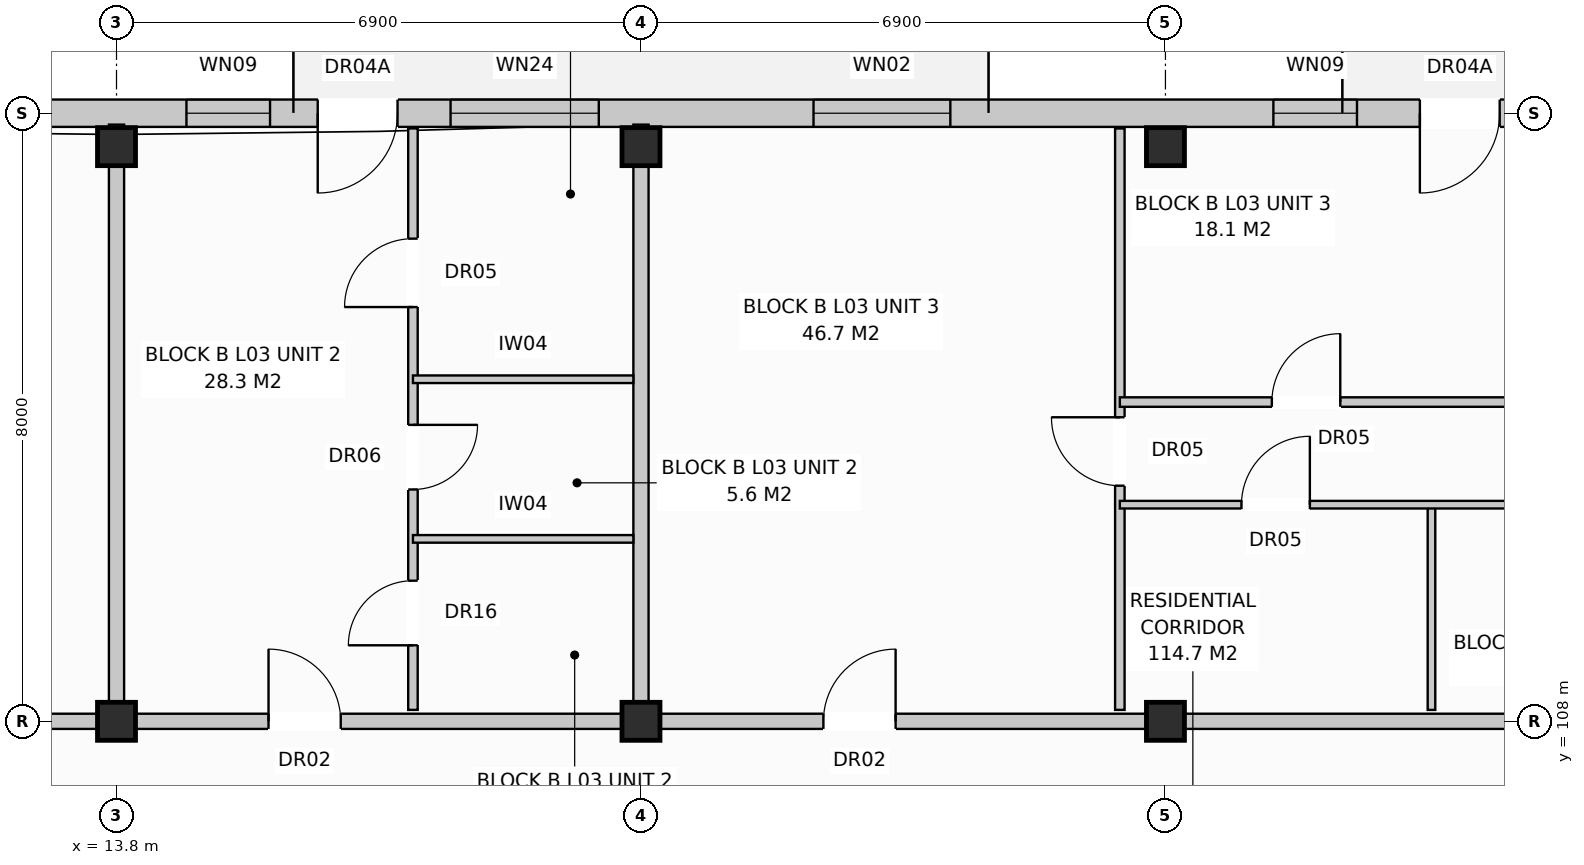
"""IFC4 building model, lengths in metres.
Left out: names, types, materials, properties, quantities, classifications, styles, units other than length and angle.
Written with IfcOpenShell. Run it as: python <this file> out.ifc"""

import sys

from ifc_helpers import new_model, si_unit, direction, frame, frame_2d, origin, origin_with_axes, origin_2d, place, context, subcontext, project, spatial, rectangle, extrude, element, fill, save


model = new_model("IFC4")
c1 = context("Model", 3, precision=1e-05, world=origin(), true_north=direction((0.0, 1.0)))
c2 = subcontext(c1, "Body", "Model", "MODEL_VIEW")
j1 = project(units=[si_unit("LENGTHUNIT", "METRE"), si_unit("PLANEANGLEUNIT", "RADIAN")], contexts=[c1])
p1 = place(None, origin())
s1 = spatial("IfcSite", under=j1, at=p1, CompositionType="ELEMENT")
p2 = place(p1, origin())
s2 = spatial("IfcBuilding", under=s1, at=p2, CompositionType="ELEMENT")
p3 = place(p2, frame((0.0, 0.0, 11.2)))
s3 = spatial("IfcBuildingStorey", under=s2, at=p3, CompositionType="ELEMENT", Elevation=11.2)
for number, where, z_axis, x_axis in (
    (1, (13.8, 108.0, 0.0), (0.0, 0.0, 1.0), (1.0, 0.0, 0.0)),
    (2, (13.8, 115.56, 0.0), (0.0, 0.0, 1.0), (1.0, 0.0, 0.0)),
    (3, (20.7, 108.0, 0.0), (0.0, 0.0, 1.0), (1.0, 0.0, 0.0)),
    (4, (20.7, 115.56, 0.0), (0.0, 0.0, 1.0), (1.0, 0.0, 0.0)),
    (5, (27.6, 108.0, 0.0), (0.0, 0.0, 1.0), (1.0, 0.0, 0.0)),
    (6, (27.6, 115.56, 0.0), (0.0, 0.0, 1.0), (1.0, 0.0, 0.0)),
):
    element("IfcColumn", number, at=place(p3, frame(where, z_axis=z_axis, x_axis=x_axis)), inside=s3, PredefinedType="COLUMN", context=c2, shape_type="SweptSolid", body=[
        extrude(rectangle(XDim=0.5, YDim=0.5, at=origin_2d()), origin(), (0.0, 0.0, 1.0), 3.2),
    ])
p4 = place(p3, frame((0.17, 116.0, 0.0), z_axis=(0.0, 0.0, 1.0), x_axis=(1.0, 0.0, 0.0)))
e7 = element("IfcWall", 7, at=p4, inside=s3, PredefinedType="STANDARD", context=c2, shape_type="SweptSolid", body=[
    extrude(rectangle(XDim=54.86, YDim=0.36, at=frame_2d((27.43, 0.0))), origin(), (0.0, 0.0, 1.0), 2.94),
])
p5 = place(p4, frame((2.777, 0.0, 0.0)))
e8 = element("IfcOpeningElement", 8, at=p5, cuts=e7, PredefinedType="OPENING", context=c2, shape_type="SweptSolid", body=[
    extrude(rectangle(XDim=1.05, YDim=2.12, at=frame_2d((0.525, 1.06))), frame((0.0, 0.192, 0.0), z_axis=(0.0, -1.0, 0.0), x_axis=(1.0, 0.0, 0.0)), (0.0, 0.0, 1.0), 0.384),
])
p6 = place(p4, frame((16.277, 0.0, 0.0)))
e9 = element("IfcOpeningElement", 9, at=p6, cuts=e7, PredefinedType="OPENING", context=c2, shape_type="SweptSolid", body=[
    extrude(rectangle(XDim=1.05, YDim=2.12, at=frame_2d((0.525, 1.06))), frame((0.0, 0.192, 0.0), z_axis=(0.0, -1.0, 0.0), x_axis=(1.0, 0.0, 0.0)), (0.0, 0.0, 1.0), 0.384),
])
p7 = place(p4, frame((30.777, 0.0, 0.0)))
e10 = element("IfcOpeningElement", 10, at=p7, cuts=e7, PredefinedType="OPENING", context=c2, shape_type="SweptSolid", body=[
    extrude(rectangle(XDim=1.05, YDim=2.12, at=frame_2d((0.525, 1.06))), frame((0.0, 0.192, 0.0), z_axis=(0.0, -1.0, 0.0), x_axis=(1.0, 0.0, 0.0)), (0.0, 0.0, 1.0), 0.384),
])
p8 = place(p4, frame((45.157, 0.0, 0.0)))
e11 = element("IfcOpeningElement", 11, at=p8, cuts=e7, PredefinedType="OPENING", context=c2, shape_type="SweptSolid", body=[
    extrude(rectangle(XDim=1.05, YDim=2.12, at=frame_2d((0.525, 1.06))), frame((0.0, 0.192, 0.0), z_axis=(0.0, -1.0, 0.0), x_axis=(1.0, 0.0, 0.0)), (0.0, 0.0, 1.0), 0.384),
])
p9 = place(p4, frame((1.05, 0.0, 0.72)))
e12 = element("IfcOpeningElement", 12, at=p9, cuts=e7, PredefinedType="OPENING", context=c2, shape_type="SweptSolid", body=[
    extrude(rectangle(XDim=1.1, YDim=1.5, at=frame_2d((0.55, 0.75))), frame((0.0, 0.192, 0.0), z_axis=(0.0, -1.0, 0.0), x_axis=(1.0, 0.0, 0.0)), (0.0, 0.0, 1.0), 0.384),
])
p10 = place(p4, frame((4.325, 0.0, 0.8)))
e13 = element("IfcOpeningElement", 13, at=p10, cuts=e7, PredefinedType="OPENING", context=c2, shape_type="SweptSolid", body=[
    extrude(rectangle(XDim=1.95, YDim=1.65, at=frame_2d((0.975, 0.825))), frame((0.0, 0.192, 0.0), z_axis=(0.0, -1.0, 0.0), x_axis=(1.0, 0.0, 0.0)), (0.0, 0.0, 1.0), 0.384),
])
p11 = place(p4, frame((10.45, 0.0, 0.72)))
e14 = element("IfcOpeningElement", 14, at=p11, cuts=e7, PredefinedType="OPENING", context=c2, shape_type="SweptSolid", body=[
    extrude(rectangle(XDim=1.1, YDim=1.5, at=frame_2d((0.55, 0.75))), frame((0.0, 0.192, 0.0), z_axis=(0.0, -1.0, 0.0), x_axis=(1.0, 0.0, 0.0)), (0.0, 0.0, 1.0), 0.384),
])
p12 = place(p4, frame((14.55, 0.0, 0.72)))
e15 = element("IfcOpeningElement", 15, at=p12, cuts=e7, PredefinedType="OPENING", context=c2, shape_type="SweptSolid", body=[
    extrude(rectangle(XDim=1.1, YDim=1.5, at=frame_2d((0.55, 0.75))), frame((0.0, 0.192, 0.0), z_axis=(0.0, -1.0, 0.0), x_axis=(1.0, 0.0, 0.0)), (0.0, 0.0, 1.0), 0.384),
])
p13 = place(p4, frame((18.025, 0.0, 0.8)))
e16 = element("IfcOpeningElement", 16, at=p13, cuts=e7, PredefinedType="OPENING", context=c2, shape_type="SweptSolid", body=[
    extrude(rectangle(XDim=1.95, YDim=1.65, at=frame_2d((0.975, 0.825))), frame((0.0, 0.192, 0.0), z_axis=(0.0, -1.0, 0.0), x_axis=(1.0, 0.0, 0.0)), (0.0, 0.0, 1.0), 0.384),
])
p14 = place(p4, frame((22.8, 0.0, 0.8)))
e17 = element("IfcOpeningElement", 17, at=p14, cuts=e7, PredefinedType="OPENING", context=c2, shape_type="SweptSolid", body=[
    extrude(rectangle(XDim=1.8, YDim=1.7, at=frame_2d((0.9, 0.85))), frame((0.0, 0.192, 0.0), z_axis=(0.0, -1.0, 0.0), x_axis=(1.0, 0.0, 0.0)), (0.0, 0.0, 1.0), 0.384),
])
p15 = place(p4, frame((28.85, 0.0, 0.72)))
e18 = element("IfcOpeningElement", 18, at=p15, cuts=e7, PredefinedType="OPENING", context=c2, shape_type="SweptSolid", body=[
    extrude(rectangle(XDim=1.1, YDim=1.5, at=frame_2d((0.55, 0.75))), frame((0.0, 0.192, 0.0), z_axis=(0.0, -1.0, 0.0), x_axis=(1.0, 0.0, 0.0)), (0.0, 0.0, 1.0), 0.384),
])
p16 = place(p4, frame((34.825, 0.0, 0.8)))
e19 = element("IfcOpeningElement", 19, at=p16, cuts=e7, PredefinedType="OPENING", context=c2, shape_type="SweptSolid", body=[
    extrude(rectangle(XDim=1.95, YDim=1.65, at=frame_2d((0.975, 0.825))), frame((0.0, 0.192, 0.0), z_axis=(0.0, -1.0, 0.0), x_axis=(1.0, 0.0, 0.0)), (0.0, 0.0, 1.0), 0.384),
])
p17 = place(p4, frame((38.65, 0.0, 0.72)))
e20 = element("IfcOpeningElement", 20, at=p17, cuts=e7, PredefinedType="OPENING", context=c2, shape_type="SweptSolid", body=[
    extrude(rectangle(XDim=1.1, YDim=1.5, at=frame_2d((0.55, 0.75))), frame((0.0, 0.192, 0.0), z_axis=(0.0, -1.0, 0.0), x_axis=(1.0, 0.0, 0.0)), (0.0, 0.0, 1.0), 0.384),
])
p18 = place(p4, frame((43.35, 0.0, 0.72)))
e21 = element("IfcOpeningElement", 21, at=p18, cuts=e7, PredefinedType="OPENING", context=c2, shape_type="SweptSolid", body=[
    extrude(rectangle(XDim=1.1, YDim=1.5, at=frame_2d((0.55, 0.75))), frame((0.0, 0.192, 0.0), z_axis=(0.0, -1.0, 0.0), x_axis=(1.0, 0.0, 0.0)), (0.0, 0.0, 1.0), 0.384),
])
p19 = place(p4, frame((48.583, 0.0, 0.8)))
e22 = element("IfcOpeningElement", 22, at=p19, cuts=e7, PredefinedType="OPENING", context=c2, shape_type="SweptSolid", body=[
    extrude(rectangle(XDim=1.95, YDim=1.65, at=frame_2d((0.975, 0.825))), frame((0.0, 0.192, 0.0), z_axis=(0.0, -1.0, 0.0), x_axis=(1.0, 0.0, 0.0)), (0.0, 0.0, 1.0), 0.384),
])
p20 = place(p4, frame((52.25, 0.0, 0.72)))
e23 = element("IfcOpeningElement", 23, at=p20, cuts=e7, PredefinedType="OPENING", context=c2, shape_type="SweptSolid", body=[
    extrude(rectangle(XDim=1.1, YDim=1.5, at=frame_2d((0.55, 0.75))), frame((0.0, 0.192, 0.0), z_axis=(0.0, -1.0, 0.0), x_axis=(1.0, 0.0, 0.0)), (0.0, 0.0, 1.0), 0.384),
])
p21 = place(p3, frame((13.8, 108.15, 0.0), z_axis=(0.0, 0.0, 1.0), x_axis=(0.0, 1.0, 0.0)))
e24 = element("IfcWall", 24, at=p21, inside=s3, PredefinedType="PARTITIONING", context=c2, shape_type="SweptSolid", body=[
    extrude(rectangle(XDim=7.7, YDim=0.2, at=frame_2d((3.85, 0.0))), origin(), (0.0, 0.0, 1.0), 2.94),
])
p22 = place(p3, frame((0.0, 108.0, 0.0), z_axis=(0.0, 0.0, 1.0), x_axis=(1.0, 0.0, 0.0)))
e25 = element("IfcWall", 25, at=p22, inside=s3, PredefinedType="PARTITIONING", context=c2, shape_type="SweptSolid", body=[
    extrude(rectangle(XDim=13.8, YDim=0.2, at=frame_2d((6.9, 0.0))), origin(), (0.0, 0.0, 1.0), 2.38),
])
p23 = place(p22, frame((9.6, 0.0, 0.0)))
e26 = element("IfcOpeningElement", 26, at=p23, cuts=e25, PredefinedType="OPENING", context=c2, shape_type="SweptSolid", body=[
    extrude(rectangle(XDim=0.95, YDim=2.15, at=frame_2d((0.475, 1.075))), frame((0.0, 0.112, 0.0), z_axis=(0.0, -1.0, 0.0), x_axis=(1.0, 0.0, 0.0)), (0.0, 0.0, 1.0), 0.224),
])
p24 = place(p3, frame((20.7, 108.15, 0.0), z_axis=(0.0, 0.0, 1.0), x_axis=(0.0, 1.0, 0.0)))
e27 = element("IfcWall", 27, at=p24, inside=s3, PredefinedType="PARTITIONING", context=c2, shape_type="SweptSolid", body=[
    extrude(rectangle(XDim=7.7, YDim=0.2, at=frame_2d((3.85, 0.0))), origin(), (0.0, 0.0, 1.0), 2.94),
])
p25 = place(p3, frame((13.8, 108.0, 0.0), z_axis=(0.0, 0.0, 1.0), x_axis=(1.0, 0.0, 0.0)))
e28 = element("IfcWall", 28, at=p25, inside=s3, PredefinedType="PARTITIONING", context=c2, shape_type="SweptSolid", body=[
    extrude(rectangle(XDim=6.9, YDim=0.2, at=frame_2d((3.45, 0.0))), origin(), (0.0, 0.0, 1.0), 2.38),
])
p26 = place(p25, frame((2.0, 0.0, 0.0)))
e29 = element("IfcOpeningElement", 29, at=p26, cuts=e28, PredefinedType="OPENING", context=c2, shape_type="SweptSolid", body=[
    extrude(rectangle(XDim=0.95, YDim=2.15, at=frame_2d((0.475, 1.075))), frame((0.0, 0.112, 0.0), z_axis=(0.0, -1.0, 0.0), x_axis=(1.0, 0.0, 0.0)), (0.0, 0.0, 1.0), 0.224),
])
p27 = place(p3, frame((17.7, 108.15, 0.0), z_axis=(0.0, 0.0, 1.0), x_axis=(0.0, 1.0, 0.0)))
e30 = element("IfcWall", 30, at=p27, inside=s3, PredefinedType="PARTITIONING", context=c2, shape_type="SweptSolid", body=[
    extrude(rectangle(XDim=7.65, YDim=0.125, at=frame_2d((3.825, 0.0))), origin(), (0.0, 0.0, 1.0), 2.94),
])
p28 = place(p27, frame((0.85, 0.0, 0.0)))
e31 = element("IfcOpeningElement", 31, at=p28, cuts=e30, PredefinedType="OPENING", context=c2, shape_type="SweptSolid", body=[
    extrude(rectangle(XDim=0.85, YDim=2.1, at=frame_2d((0.425, 1.05))), frame((0.0, 0.074, 0.0), z_axis=(0.0, -1.0, 0.0), x_axis=(1.0, 0.0, 0.0)), (0.0, 0.0, 1.0), 0.149),
])
p29 = place(p27, frame((2.9, 0.0, 0.0)))
e32 = element("IfcOpeningElement", 32, at=p29, cuts=e30, PredefinedType="OPENING", context=c2, shape_type="SweptSolid", body=[
    extrude(rectangle(XDim=0.85, YDim=2.05, at=frame_2d((0.425, 1.025))), frame((0.0, 0.074, 0.0), z_axis=(0.0, -1.0, 0.0), x_axis=(1.0, 0.0, 0.0)), (0.0, 0.0, 1.0), 0.149),
])
p30 = place(p27, frame((5.3, 0.0, 0.0)))
e33 = element("IfcOpeningElement", 33, at=p30, cuts=e30, PredefinedType="OPENING", context=c2, shape_type="SweptSolid", body=[
    extrude(rectangle(XDim=0.9, YDim=2.1, at=frame_2d((0.45, 1.05))), frame((0.0, 0.074, 0.0), z_axis=(0.0, -1.0, 0.0), x_axis=(1.0, 0.0, 0.0)), (0.0, 0.0, 1.0), 0.149),
])
for number, where, z_axis, x_axis in (
    (34, (17.7, 110.4, 0.0), (0.0, 0.0, 1.0), (1.0, 0.0, 0.0)),
    (35, (17.7, 112.5, 0.0), (0.0, 0.0, 1.0), (1.0, 0.0, 0.0)),
):
    element("IfcWall", number, at=place(p3, frame(where, z_axis=z_axis, x_axis=x_axis)), inside=s3, PredefinedType="PARTITIONING", context=c2, shape_type="SweptSolid", body=[
        extrude(rectangle(XDim=2.9, YDim=0.1, at=frame_2d((1.45, 0.0))), origin(), (0.0, 0.0, 1.0), 2.94),
    ])
p31 = place(p3, frame((20.7, 108.0, 0.0), z_axis=(0.0, 0.0, 1.0), x_axis=(1.0, 0.0, 0.0)))
e36 = element("IfcWall", 36, at=p31, inside=s3, PredefinedType="PARTITIONING", context=c2, shape_type="SweptSolid", body=[
    extrude(rectangle(XDim=20.7, YDim=0.2, at=frame_2d((10.35, 0.0))), origin(), (0.0, 0.0, 1.0), 2.38),
])
p32 = place(p31, frame((2.4, 0.0, 0.0)))
e37 = element("IfcOpeningElement", 37, at=p32, cuts=e36, PredefinedType="OPENING", context=c2, shape_type="SweptSolid", body=[
    extrude(rectangle(XDim=0.95, YDim=2.15, at=frame_2d((0.475, 1.075))), frame((0.0, 0.112, 0.0), z_axis=(0.0, -1.0, 0.0), x_axis=(1.0, 0.0, 0.0)), (0.0, 0.0, 1.0), 0.224),
])
p33 = place(p3, frame((27.0, 108.15, 0.0), z_axis=(0.0, 0.0, 1.0), x_axis=(0.0, 1.0, 0.0)))
e38 = element("IfcWall", 38, at=p33, inside=s3, PredefinedType="PARTITIONING", context=c2, shape_type="SweptSolid", body=[
    extrude(rectangle(XDim=7.65, YDim=0.125, at=frame_2d((3.825, 0.0))), origin(), (0.0, 0.0, 1.0), 2.94),
])
p34 = place(p33, frame((2.95, 0.0, 0.0)))
e39 = element("IfcOpeningElement", 39, at=p34, cuts=e38, PredefinedType="OPENING", context=c2, shape_type="SweptSolid", body=[
    extrude(rectangle(XDim=0.9, YDim=2.1, at=frame_2d((0.45, 1.05))), frame((0.0, 0.074, 0.0), z_axis=(0.0, -1.0, 0.0), x_axis=(1.0, 0.0, 0.0)), (0.0, 0.0, 1.0), 0.149),
])
p35 = place(p3, frame((31.1, 108.15, 0.0), z_axis=(0.0, 0.0, 1.0), x_axis=(0.0, 1.0, 0.0)))
e40 = element("IfcWall", 40, at=p35, inside=s3, PredefinedType="PARTITIONING", context=c2, shape_type="SweptSolid", body=[
    extrude(rectangle(XDim=2.7, YDim=0.1, at=frame_2d((1.35, 0.0))), origin(), (0.0, 0.0, 1.0), 2.94),
])
p36 = place(p3, frame((27.0, 110.85, 0.0), z_axis=(0.0, 0.0, 1.0), x_axis=(1.0, 0.0, 0.0)))
e41 = element("IfcWall", 41, at=p36, inside=s3, PredefinedType="PARTITIONING", context=c2, shape_type="SweptSolid", body=[
    extrude(rectangle(XDim=14.3, YDim=0.1, at=frame_2d((7.15, 0.0))), origin(), (0.0, 0.0, 1.0), 2.94),
])
p37 = place(p36, frame((1.6, 0.0, 0.0)))
e42 = element("IfcOpeningElement", 42, at=p37, cuts=e41, PredefinedType="OPENING", context=c2, shape_type="SweptSolid", body=[
    extrude(rectangle(XDim=0.9, YDim=2.1, at=frame_2d((0.45, 1.05))), frame((0.0, 0.062, 0.0), z_axis=(0.0, -1.0, 0.0), x_axis=(1.0, 0.0, 0.0)), (0.0, 0.0, 1.0), 0.124),
])
p38 = place(p36, frame((5.1, 0.0, 0.0)))
e43 = element("IfcOpeningElement", 43, at=p38, cuts=e41, PredefinedType="OPENING", context=c2, shape_type="SweptSolid", body=[
    extrude(rectangle(XDim=0.85, YDim=2.05, at=frame_2d((0.425, 1.025))), frame((0.0, 0.062, 0.0), z_axis=(0.0, -1.0, 0.0), x_axis=(1.0, 0.0, 0.0)), (0.0, 0.0, 1.0), 0.124),
])
p39 = place(p36, frame((8.2, 0.0, 0.0)))
e44 = element("IfcOpeningElement", 44, at=p39, cuts=e41, PredefinedType="OPENING", context=c2, shape_type="SweptSolid", body=[
    extrude(rectangle(XDim=0.85, YDim=2.05, at=frame_2d((0.425, 1.025))), frame((0.0, 0.062, 0.0), z_axis=(0.0, -1.0, 0.0), x_axis=(1.0, 0.0, 0.0)), (0.0, 0.0, 1.0), 0.124),
])
p40 = place(p36, frame((11.6, 0.0, 0.0)))
e45 = element("IfcOpeningElement", 45, at=p40, cuts=e41, PredefinedType="OPENING", context=c2, shape_type="SweptSolid", body=[
    extrude(rectangle(XDim=0.85, YDim=2.05, at=frame_2d((0.425, 1.025))), frame((0.0, 0.062, 0.0), z_axis=(0.0, -1.0, 0.0), x_axis=(1.0, 0.0, 0.0)), (0.0, 0.0, 1.0), 0.124),
])
p41 = place(p3, frame((27.0, 112.2, 0.0), z_axis=(0.0, 0.0, 1.0), x_axis=(1.0, 0.0, 0.0)))
e46 = element("IfcWall", 46, at=p41, inside=s3, PredefinedType="PARTITIONING", context=c2, shape_type="SweptSolid", body=[
    extrude(rectangle(XDim=10.4, YDim=0.125, at=frame_2d((5.2, 0.0))), origin(), (0.0, 0.0, 1.0), 2.94),
])
p42 = place(p41, frame((2.0, 0.0, 0.0)))
e47 = element("IfcOpeningElement", 47, at=p42, cuts=e46, PredefinedType="OPENING", context=c2, shape_type="SweptSolid", body=[
    extrude(rectangle(XDim=0.9, YDim=2.1, at=frame_2d((0.45, 1.05))), frame((0.0, 0.074, 0.0), z_axis=(0.0, -1.0, 0.0), x_axis=(1.0, 0.0, 0.0)), (0.0, 0.0, 1.0), 0.149),
])
p43 = place(p41, frame((7.2, 0.0, 0.0)))
e48 = element("IfcOpeningElement", 48, at=p43, cuts=e46, PredefinedType="OPENING", context=c2, shape_type="SweptSolid", body=[
    extrude(rectangle(XDim=0.9, YDim=2.1, at=frame_2d((0.45, 1.05))), frame((0.0, 0.074, 0.0), z_axis=(0.0, -1.0, 0.0), x_axis=(1.0, 0.0, 0.0)), (0.0, 0.0, 1.0), 0.149),
])
p44 = place(p6, frame((1.05, 0.0, 0.0), z_axis=(0.0, 0.0, 1.0), x_axis=(-1.0, 0.0, 0.0)))
e49 = element("IfcDoor", 49, at=p44, inside=s3, OperationType="SINGLE_SWING_LEFT", PredefinedType="DOOR", context=c2, shape_type="SweptSolid", body=[
    extrude(rectangle(XDim=1.05, YDim=2.12, at=frame_2d((0.525, 1.06))), frame((0.0, 0.025, 0.0), z_axis=(0.0, -1.0, 0.0), x_axis=(1.0, 0.0, 0.0)), (0.0, 0.0, 1.0), 0.05),
])
fill(e9, e49)
p45 = place(p7, frame((1.05, 0.0, 0.0), z_axis=(0.0, 0.0, 1.0), x_axis=(-1.0, 0.0, 0.0)))
e50 = element("IfcDoor", 50, at=p45, inside=s3, OperationType="SINGLE_SWING_LEFT", PredefinedType="DOOR", context=c2, shape_type="SweptSolid", body=[
    extrude(rectangle(XDim=1.05, YDim=2.12, at=frame_2d((0.525, 1.06))), frame((0.0, 0.025, 0.0), z_axis=(0.0, -1.0, 0.0), x_axis=(1.0, 0.0, 0.0)), (0.0, 0.0, 1.0), 0.05),
])
fill(e10, e50)
p46 = place(p12, origin_with_axes())
e51 = element("IfcWindow", 51, at=p46, inside=s3, PartitioningType="SINGLE_PANEL", PredefinedType="WINDOW", context=c2, shape_type="SweptSolid", body=[
    extrude(rectangle(XDim=1.1, YDim=1.5, at=frame_2d((0.55, 0.75))), frame((0.0, 0.03, 0.0), z_axis=(0.0, -1.0, 0.0), x_axis=(1.0, 0.0, 0.0)), (0.0, 0.0, 1.0), 0.06),
])
fill(e15, e51)
p47 = place(p13, origin_with_axes())
e52 = element("IfcWindow", 52, at=p47, inside=s3, PartitioningType="SINGLE_PANEL", PredefinedType="WINDOW", context=c2, shape_type="SweptSolid", body=[
    extrude(rectangle(XDim=1.95, YDim=1.65, at=frame_2d((0.975, 0.825))), frame((0.0, 0.03, 0.0), z_axis=(0.0, -1.0, 0.0), x_axis=(1.0, 0.0, 0.0)), (0.0, 0.0, 1.0), 0.06),
])
fill(e16, e52)
p48 = place(p14, origin_with_axes())
e53 = element("IfcWindow", 53, at=p48, inside=s3, PartitioningType="SINGLE_PANEL", PredefinedType="WINDOW", context=c2, shape_type="SweptSolid", body=[
    extrude(rectangle(XDim=1.8, YDim=1.7, at=frame_2d((0.9, 0.85))), frame((0.0, 0.03, 0.0), z_axis=(0.0, -1.0, 0.0), x_axis=(1.0, 0.0, 0.0)), (0.0, 0.0, 1.0), 0.06),
])
fill(e17, e53)
p49 = place(p15, origin_with_axes())
e54 = element("IfcWindow", 54, at=p49, inside=s3, PartitioningType="SINGLE_PANEL", PredefinedType="WINDOW", context=c2, shape_type="SweptSolid", body=[
    extrude(rectangle(XDim=1.1, YDim=1.5, at=frame_2d((0.55, 0.75))), frame((0.0, 0.03, 0.0), z_axis=(0.0, -1.0, 0.0), x_axis=(1.0, 0.0, 0.0)), (0.0, 0.0, 1.0), 0.06),
])
fill(e18, e54)
p50 = place(p26, origin_with_axes())
e55 = element("IfcDoor", 55, at=p50, inside=s3, OperationType="SINGLE_SWING_LEFT", PredefinedType="DOOR", context=c2, shape_type="SweptSolid", body=[
    extrude(rectangle(XDim=0.95, YDim=2.15, at=frame_2d((0.475, 1.075))), frame((0.0, 0.025, 0.0), z_axis=(0.0, -1.0, 0.0), x_axis=(1.0, 0.0, 0.0)), (0.0, 0.0, 1.0), 0.05),
])
fill(e29, e55)
p51 = place(p28, origin_with_axes())
e56 = element("IfcDoor", 56, at=p51, inside=s3, OperationType="SINGLE_SWING_LEFT", PredefinedType="DOOR", context=c2, shape_type="SweptSolid", body=[
    extrude(rectangle(XDim=0.85, YDim=2.1, at=frame_2d((0.425, 1.05))), frame((0.0, 0.025, 0.0), z_axis=(0.0, -1.0, 0.0), x_axis=(1.0, 0.0, 0.0)), (0.0, 0.0, 1.0), 0.05),
])
fill(e31, e56)
p52 = place(p29, frame((0.85, 0.0, 0.0), z_axis=(0.0, 0.0, 1.0), x_axis=(-1.0, 0.0, 0.0)))
e57 = element("IfcDoor", 57, at=p52, inside=s3, OperationType="SINGLE_SWING_RIGHT", PredefinedType="DOOR", context=c2, shape_type="SweptSolid", body=[
    extrude(rectangle(XDim=0.85, YDim=2.05, at=frame_2d((0.425, 1.025))), frame((0.0, 0.025, 0.0), z_axis=(0.0, -1.0, 0.0), x_axis=(1.0, 0.0, 0.0)), (0.0, 0.0, 1.0), 0.05),
])
fill(e32, e57)
p53 = place(p30, origin_with_axes())
e58 = element("IfcDoor", 58, at=p53, inside=s3, OperationType="SINGLE_SWING_LEFT", PredefinedType="DOOR", context=c2, shape_type="SweptSolid", body=[
    extrude(rectangle(XDim=0.9, YDim=2.1, at=frame_2d((0.45, 1.05))), frame((0.0, 0.025, 0.0), z_axis=(0.0, -1.0, 0.0), x_axis=(1.0, 0.0, 0.0)), (0.0, 0.0, 1.0), 0.05),
])
fill(e33, e58)
p54 = place(p32, origin_with_axes())
e59 = element("IfcDoor", 59, at=p54, inside=s3, OperationType="SINGLE_SWING_RIGHT", PredefinedType="DOOR", context=c2, shape_type="SweptSolid", body=[
    extrude(rectangle(XDim=0.95, YDim=2.15, at=frame_2d((0.475, 1.075))), frame((0.0, 0.025, 0.0), z_axis=(0.0, -1.0, 0.0), x_axis=(1.0, 0.0, 0.0)), (0.0, 0.0, 1.0), 0.05),
])
fill(e37, e59)
p55 = place(p34, origin_with_axes())
e60 = element("IfcDoor", 60, at=p55, inside=s3, OperationType="SINGLE_SWING_RIGHT", PredefinedType="DOOR", context=c2, shape_type="SweptSolid", body=[
    extrude(rectangle(XDim=0.9, YDim=2.1, at=frame_2d((0.45, 1.05))), frame((0.0, 0.025, 0.0), z_axis=(0.0, -1.0, 0.0), x_axis=(1.0, 0.0, 0.0)), (0.0, 0.0, 1.0), 0.05),
])
fill(e39, e60)
p56 = place(p37, origin_with_axes())
e61 = element("IfcDoor", 61, at=p56, inside=s3, OperationType="SINGLE_SWING_RIGHT", PredefinedType="DOOR", context=c2, shape_type="SweptSolid", body=[
    extrude(rectangle(XDim=0.9, YDim=2.1, at=frame_2d((0.45, 1.05))), frame((0.0, 0.025, 0.0), z_axis=(0.0, -1.0, 0.0), x_axis=(1.0, 0.0, 0.0)), (0.0, 0.0, 1.0), 0.05),
])
fill(e42, e61)
p57 = place(p42, origin_with_axes())
e62 = element("IfcDoor", 62, at=p57, inside=s3, OperationType="SINGLE_SWING_RIGHT", PredefinedType="DOOR", context=c2, shape_type="SweptSolid", body=[
    extrude(rectangle(XDim=0.9, YDim=2.1, at=frame_2d((0.45, 1.05))), frame((0.0, 0.025, 0.0), z_axis=(0.0, -1.0, 0.0), x_axis=(1.0, 0.0, 0.0)), (0.0, 0.0, 1.0), 0.05),
])
fill(e47, e62)
save(model, sys.argv[1])
